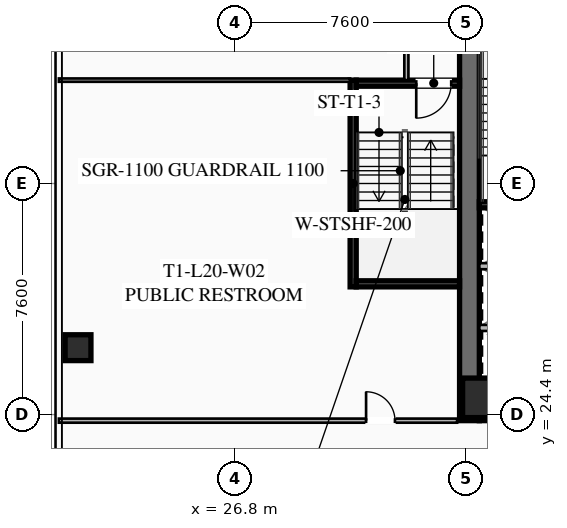
"""IFC4 building model, lengths in metres.
Left out: names, types, materials, properties, quantities, classifications, styles, units other than length and angle.
Written with IfcOpenShell. Run it as: python <this file> out.ifc"""

import sys

from ifc_helpers import new_model, si_unit, direction, frame, frame_2d, origin, origin_2d, place, context, subcontext, project, spatial, rectangle, hollow_rectangle, extrude, element, fill, save


model = new_model("IFC4")
c1 = context("Model", 3, precision=1e-05, world=origin(), true_north=direction((0.0, 1.0)))
c2 = subcontext(c1, "Body", "Model", "MODEL_VIEW")
j1 = project(units=[si_unit("LENGTHUNIT", "METRE"), si_unit("PLANEANGLEUNIT", "RADIAN")], contexts=[c1])
p1 = place(None, origin())
s1 = spatial("IfcSite", under=j1, at=p1, CompositionType="ELEMENT")
p2 = place(p1, origin())
s2 = spatial("IfcBuilding", under=s1, at=p2, CompositionType="ELEMENT")
p3 = place(p2, frame((0.0, 0.0, 77.85)))
s3 = spatial("IfcBuildingStorey", under=s2, at=p3, CompositionType="ELEMENT", Elevation=77.85)
p4 = place(p3, frame((34.525, 24.2, 0.0), z_axis=(0.0, 0.0, 1.0), x_axis=(0.0, 1.0, 0.0)))
e1 = element("IfcWall", 1, at=p4, inside=s3, PredefinedType="SHEAR", context=c2, shape_type="SweptSolid", body=[
    extrude(rectangle(XDim=15.6, YDim=0.65, at=frame_2d((7.8, 0.0))), origin(), (0.0, 0.0, 1.0), 3.55),
])
p5 = place(p3, frame((49.15, 24.525, 0.0), z_axis=(0.0, 0.0, 1.0), x_axis=(-1.0, 0.0, 0.0)))
e2 = element("IfcWall", 2, at=p5, inside=s3, PredefinedType="SHEAR", context=c2, shape_type="SweptSolid", body=[
    extrude(rectangle(XDim=14.3, YDim=0.65, at=frame_2d((7.15, 0.0))), origin(), (0.0, 0.0, 1.0), 3.55),
])
p6 = place(p5, frame((8.85, 0.0, 0.0)))
e3 = element("IfcOpeningElement", 3, at=p6, cuts=e2, PredefinedType="OPENING", context=c2, shape_type="SweptSolid", body=[
    extrude(rectangle(XDim=1.25, YDim=2.25, at=frame_2d((0.625, 1.125))), frame((0.0, 0.335, 0.0), z_axis=(0.0, -1.0, 0.0), x_axis=(1.0, 0.0, 0.0)), (0.0, 0.0, 1.0), 0.67),
])
p7 = place(p5, frame((3.8, 0.0, 0.0)))
e4 = element("IfcOpeningElement", 4, at=p7, cuts=e2, PredefinedType="OPENING", context=c2, shape_type="SweptSolid", body=[
    extrude(rectangle(XDim=1.25, YDim=2.25, at=frame_2d((0.625, 1.125))), frame((0.0, 0.335, 0.0), z_axis=(0.0, -1.0, 0.0), x_axis=(1.0, 0.0, 0.0)), (0.0, 0.0, 1.0), 0.67),
])
p8 = place(p3, frame((34.95, 24.95, 0.0), z_axis=(0.0, 0.0, 1.0), x_axis=(1.0, 0.0, 0.0)))
e5 = element("IfcColumn", 5, at=p8, inside=s3, PredefinedType="COLUMN", context=c2, shape_type="SweptSolid", body=[
    extrude(hollow_rectangle(XDim=1.3, YDim=1.3, WallThickness=0.05, at=origin_2d()), origin(), (0.0, 0.0, 1.0), 3.35),
])
p9 = place(p3, frame((21.65, 26.6, 0.0), z_axis=(0.0, 0.0, 1.0), x_axis=(1.0, 0.0, 0.0)))
e6 = element("IfcColumn", 6, at=p9, inside=s3, PredefinedType="COLUMN", context=c2, shape_type="SweptSolid", body=[
    extrude(hollow_rectangle(XDim=0.85, YDim=0.85, WallThickness=0.035, at=origin_2d()), origin(), (0.0, 0.0, 1.0), 3.35),
])
p10 = place(p3, frame((34.85, 31.3, 0.0), z_axis=(0.0, 0.0, 1.0), x_axis=(1.0, 0.0, 0.0)))
e7 = element("IfcWall", 7, at=p10, inside=s3, PredefinedType="SHEAR", context=c2, shape_type="SweptSolid", body=[
    extrude(rectangle(XDim=3.45, YDim=0.2, at=frame_2d((1.725, 0.0))), origin(), (0.0, 0.0, 1.0), 3.35),
])
for number, where, z_axis, x_axis in (
    (8, (34.85, 27.25, 0.0), (0.0, 0.0, 1.0), (1.0, 0.0, 0.0)),
    (9, (34.85, 29.28, 0.0), (0.0, 0.0, 1.0), (1.0, 0.0, 0.0)),
):
    element("IfcWall", number, at=place(p3, frame(where, z_axis=z_axis, x_axis=x_axis)), inside=s3, PredefinedType="SOLIDWALL", context=c2, shape_type="SweptSolid", body=[
        extrude(rectangle(XDim=3.1, YDim=0.2, at=frame_2d((1.55, 0.0))), origin(), (0.0, 0.0, 1.0), 3.35),
    ])
p11 = place(p3, frame((30.7, 28.6, 0.0), z_axis=(0.0, 0.0, 1.0), x_axis=(0.0, 1.0, 0.0)))
e10 = element("IfcWall", 10, at=p11, inside=s3, PredefinedType="SHEAR", context=c2, shape_type="SweptSolid", body=[
    extrude(rectangle(XDim=6.8, YDim=0.2, at=frame_2d((3.4, 0.0))), origin(), (0.0, 0.0, 1.0), 3.35),
])
p12 = place(p3, frame((34.2, 35.3, 0.0), z_axis=(0.0, 0.0, 1.0), x_axis=(-1.0, 0.0, 0.0)))
e11 = element("IfcWall", 11, at=p12, inside=s3, PredefinedType="SHEAR", context=c2, shape_type="SweptSolid", body=[
    extrude(rectangle(XDim=3.4, YDim=0.2, at=frame_2d((1.7, 0.0))), origin(), (0.0, 0.0, 1.0), 3.35),
])
p13 = place(p12, frame((0.275, 0.0, 0.0)))
e12 = element("IfcOpeningElement", 12, at=p13, cuts=e11, PredefinedType="OPENING", context=c2, shape_type="SweptSolid", body=[
    extrude(rectangle(XDim=1.15, YDim=2.2, at=frame_2d((0.575, 1.1))), frame((0.0, 0.11, 0.0), z_axis=(0.0, -1.0, 0.0), x_axis=(1.0, 0.0, 0.0)), (0.0, 0.0, 1.0), 0.22),
])
p14 = place(p3, frame((30.8, 28.7, 0.0), z_axis=(0.0, 0.0, 1.0), x_axis=(1.0, 0.0, 0.0)))
e13 = element("IfcWall", 13, at=p14, inside=s3, PredefinedType="SHEAR", context=c2, shape_type="SweptSolid", body=[
    extrude(rectangle(XDim=3.4, YDim=0.2, at=frame_2d((1.7, 0.0))), origin(), (0.0, 0.0, 1.0), 3.35),
])
p15 = place(p3, frame((32.45, 35.4, 0.0), z_axis=(0.0, 0.0, 1.0), x_axis=(0.0, 1.0, 0.0)))
e14 = element("IfcWall", 14, at=p15, inside=s3, PredefinedType="PARTITIONING", context=c2, shape_type="SweptSolid", body=[
    extrude(rectangle(XDim=4.4, YDim=0.135, at=frame_2d((2.2, 0.0))), origin(), (0.0, 0.0, 1.0), 2.703),
])
p16 = place(p3, frame((21.02, 24.2, 0.0), z_axis=(0.0, 0.0, 1.0), x_axis=(1.0, 0.0, 0.0)))
e15 = element("IfcWall", 15, at=p16, inside=s3, PredefinedType="PARTITIONING", context=c2, shape_type="SweptSolid", body=[
    extrude(rectangle(XDim=13.1, YDim=0.135, at=frame_2d((6.55, 0.0))), origin(), (0.0, 0.0, 1.0), 2.703),
])
p17 = place(p16, frame((10.105, 0.0, 0.0)))
e16 = element("IfcOpeningElement", 16, at=p17, cuts=e15, PredefinedType="OPENING", context=c2, shape_type="SweptSolid", body=[
    extrude(rectangle(XDim=0.95, YDim=2.05, at=frame_2d((0.475, 1.025))), frame((0.0, 0.077, 0.0), z_axis=(0.0, -1.0, 0.0), x_axis=(1.0, 0.0, 0.0)), (0.0, 0.0, 1.0), 0.155),
])
p18 = place(p3, frame((30.6, 35.4, 0.0), z_axis=(0.0, 0.0, 1.0), x_axis=(-1.0, 0.0, 0.0)))
e17 = element("IfcWall", 17, at=p18, inside=s3, PredefinedType="PARTITIONING", context=c2, shape_type="SweptSolid", body=[
    extrude(rectangle(XDim=9.58, YDim=0.11, at=frame_2d((4.79, 0.0))), origin(), (0.0, 0.0, 1.0), 2.703),
])
p19 = place(p13, origin())
e18 = element("IfcDoor", 18, at=p19, inside=s3, OperationType="SINGLE_SWING_RIGHT", PredefinedType="DOOR", context=c2, shape_type="SweptSolid", body=[
    extrude(rectangle(XDim=1.15, YDim=2.2, at=frame_2d((0.575, 1.1))), frame((0.0, 0.025, 0.0), z_axis=(0.0, -1.0, 0.0), x_axis=(1.0, 0.0, 0.0)), (0.0, 0.0, 1.0), 0.05),
])
fill(e12, e18)
p20 = place(p17, origin())
e19 = element("IfcDoor", 19, at=p20, inside=s3, OperationType="SINGLE_SWING_LEFT", PredefinedType="DOOR", context=c2, shape_type="SweptSolid", body=[
    extrude(rectangle(XDim=0.95, YDim=2.05, at=frame_2d((0.475, 1.025))), frame((0.0, 0.025, 0.0), z_axis=(0.0, -1.0, 0.0), x_axis=(1.0, 0.0, 0.0)), (0.0, 0.0, 1.0), 0.05),
])
fill(e16, e19)
save(model, sys.argv[1])
